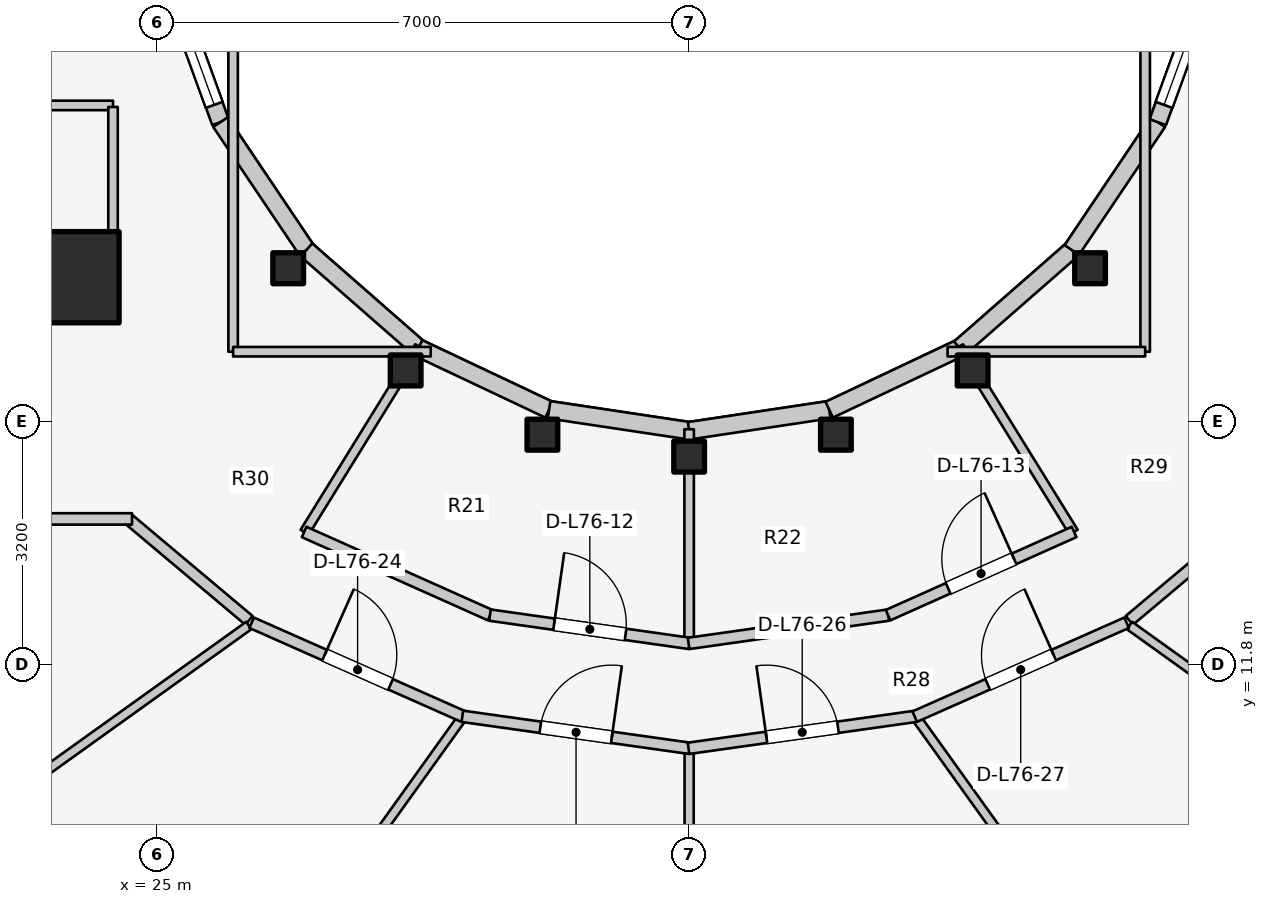
"""IFC4 building model, lengths in metres.
Left out: names, types, materials, properties, quantities, classifications, styles, units other than length and angle.
Written with IfcOpenShell. Run it as: python <this file> out.ifc"""

import sys

from ifc_helpers import new_model, si_unit, direction, frame, frame_2d, origin, origin_2d, place, context, subcontext, project, spatial, rectangle, i_section, extrude, element, fill, save


model = new_model("IFC4")
c1 = context("Model", 3, precision=1e-05, world=origin(), true_north=direction((0.0, 1.0)))
c2 = subcontext(c1, "Body", "Model", "MODEL_VIEW")
j1 = project(units=[si_unit("LENGTHUNIT", "METRE"), si_unit("PLANEANGLEUNIT", "RADIAN")], contexts=[c1])
p1 = place(None, origin())
s1 = spatial("IfcSite", under=j1, at=p1, CompositionType="ELEMENT")
p2 = place(p1, origin())
s2 = spatial("IfcBuilding", under=s1, at=p2, CompositionType="ELEMENT")
p3 = place(p2, frame((0.0, 0.0, 249.6)))
s3 = spatial("IfcBuildingStorey", under=s2, at=p3, CompositionType="ELEMENT", Elevation=249.6)
p4 = place(p3, frame((19.65, 16.55, 0.0), z_axis=(0.0, 0.0, 1.0), x_axis=(1.0, 0.0, 0.0)))
e1 = element("IfcWall", 1, at=p4, inside=s3, PredefinedType="SHEAR", context=c2, shape_type="SweptSolid", body=[
    extrude(rectangle(XDim=4.5, YDim=0.45, at=frame_2d((2.25, 0.0))), origin(), (0.0, 0.0, 1.0), 3.6),
])
p5 = place(p3, frame((23.9, 16.9, 0.0), z_axis=(0.0, 0.0, 1.0), x_axis=(1.0, 0.0, 0.0)))
e2 = element("IfcColumn", 2, at=p5, inside=s3, PredefinedType="COLUMN", context=c2, shape_type="SweptSolid", body=[
    extrude(rectangle(XDim=1.2, YDim=1.2, at=origin_2d()), origin(), (0.0, 0.0, 1.0), 3.6),
])
for number, where, z_axis, x_axis in (
    (3, (26.725, 17.018, 0.0), (0.0, 0.0, 1.0), (1.0, 0.0, 0.0)),
    (4, (28.27, 15.673, 0.0), (0.0, 0.0, 1.0), (1.0, 0.0, 0.0)),
    (5, (30.069, 14.828, 0.0), (0.0, 0.0, 1.0), (1.0, 0.0, 0.0)),
    (6, (32.0, 14.54, 0.0), (0.0, 0.0, 1.0), (1.0, 0.0, 0.0)),
    (7, (33.931, 14.828, 0.0), (0.0, 0.0, 1.0), (1.0, 0.0, 0.0)),
    (8, (35.73, 15.673, 0.0), (0.0, 0.0, 1.0), (1.0, 0.0, 0.0)),
    (9, (37.275, 17.018, 0.0), (0.0, 0.0, 1.0), (1.0, 0.0, 0.0)),
):
    element("IfcColumn", number, at=place(p3, frame(where, z_axis=z_axis, x_axis=x_axis)), inside=s3, PredefinedType="COLUMN", context=c2, shape_type="SweptSolid", body=[
        extrude(i_section(OverallWidth=0.404, OverallDepth=0.407, WebThickness=0.027, FlangeThickness=0.044, FilletRadius=0.025, at=origin_2d()), origin(), (0.0, 0.0, 1.0), 3.6),
    ])
p6 = place(p3, frame((25.123, 20.898, 0.0), z_axis=(0.0, 0.0, 1.0), x_axis=(0.341423187295, -0.93990968033, 0.0)))
e10 = element("IfcWall", 10, at=p6, inside=s3, PredefinedType="STANDARD", context=c2, shape_type="SweptSolid", body=[
    extrude(rectangle(XDim=2.084, YDim=0.23, at=frame_2d((1.042, 0.0))), origin(), (0.0, 0.0, 1.0), 3.28),
])
p7 = place(p6, frame((0.242, 0.0, 0.85)))
e11 = element("IfcOpeningElement", 11, at=p7, cuts=e10, PredefinedType="OPENING", context=c2, shape_type="SweptSolid", body=[
    extrude(rectangle(XDim=1.6, YDim=1.65, at=frame_2d((0.8, 0.825))), frame((0.0, 0.125, 0.0), z_axis=(0.0, -1.0, 0.0), x_axis=(1.0, 0.0, 0.0)), (0.0, 0.0, 1.0), 0.25),
])
p8 = place(p3, frame((25.834, 18.94, 0.0), z_axis=(0.0, 0.0, 1.0), x_axis=(0.558197800898, -0.829707909492, 0.0)))
e12 = element("IfcWall", 12, at=p8, inside=s3, PredefinedType="STANDARD", context=c2, shape_type="SweptSolid", body=[
    extrude(rectangle(XDim=2.027, YDim=0.23, at=frame_2d((1.013, 0.0))), origin(), (0.0, 0.0, 1.0), 2.6),
])
p9 = place(p3, frame((26.965, 17.258, 0.0), z_axis=(0.0, 0.0, 1.0), x_axis=(0.752576694707, -0.658504607869, 0.0)))
e13 = element("IfcWall", 13, at=p9, inside=s3, PredefinedType="STANDARD", context=c2, shape_type="SweptSolid", body=[
    extrude(rectangle(XDim=1.959, YDim=0.23, at=frame_2d((0.98, 0.0))), origin(), (0.0, 0.0, 1.0), 2.6),
])
p10 = place(p3, frame((28.44, 15.968, 0.0), z_axis=(0.0, 0.0, 1.0), x_axis=(0.904179699603, -0.427152280606, 0.0)))
e14 = element("IfcWall", 14, at=p10, inside=s3, PredefinedType="STANDARD", context=c2, shape_type="SweptSolid", body=[
    extrude(rectangle(XDim=1.899, YDim=0.23, at=frame_2d((0.95, 0.0))), origin(), (0.0, 0.0, 1.0), 2.6),
])
for number, where, z_axis, x_axis in (
    (15, (30.157, 15.157, 0.0), (0.0, 0.0, 1.0), (0.989, -0.149, 0.0)),
    (16, (32.0, 14.88, 0.0), (0.0, 0.0, 1.0), (0.989, 0.149, 0.0)),
):
    element("IfcWall", number, at=place(p3, frame(where, z_axis=z_axis, x_axis=x_axis)), inside=s3, PredefinedType="STANDARD", context=c2, shape_type="SweptSolid", body=[
        extrude(rectangle(XDim=1.864, YDim=0.23, at=frame_2d((0.932, 0.0))), origin(), (0.0, 0.0, 1.0), 2.6),
    ])
p11 = place(p3, frame((33.843, 15.157, 0.0), z_axis=(0.0, 0.0, 1.0), x_axis=(0.904179699603, 0.427152280606, 0.0)))
e17 = element("IfcWall", 17, at=p11, inside=s3, PredefinedType="STANDARD", context=c2, shape_type="SweptSolid", body=[
    extrude(rectangle(XDim=1.899, YDim=0.23, at=frame_2d((0.95, 0.0))), origin(), (0.0, 0.0, 1.0), 2.6),
])
p12 = place(p3, frame((35.56, 15.968, 0.0), z_axis=(0.0, 0.0, 1.0), x_axis=(0.752576694707, 0.658504607869, 0.0)))
e18 = element("IfcWall", 18, at=p12, inside=s3, PredefinedType="STANDARD", context=c2, shape_type="SweptSolid", body=[
    extrude(rectangle(XDim=1.959, YDim=0.23, at=frame_2d((0.98, 0.0))), origin(), (0.0, 0.0, 1.0), 2.6),
])
p13 = place(p3, frame((37.035, 17.258, 0.0), z_axis=(0.0, 0.0, 1.0), x_axis=(0.558197800898, 0.829707909492, 0.0)))
e19 = element("IfcWall", 19, at=p13, inside=s3, PredefinedType="STANDARD", context=c2, shape_type="SweptSolid", body=[
    extrude(rectangle(XDim=2.027, YDim=0.23, at=frame_2d((1.013, 0.0))), origin(), (0.0, 0.0, 1.0), 2.6),
])
p14 = place(p3, frame((38.166, 18.94, 0.0), z_axis=(0.0, 0.0, 1.0), x_axis=(0.341423187295, 0.93990968033, 0.0)))
e20 = element("IfcWall", 20, at=p14, inside=s3, PredefinedType="STANDARD", context=c2, shape_type="SweptSolid", body=[
    extrude(rectangle(XDim=2.084, YDim=0.23, at=frame_2d((1.042, 0.0))), origin(), (0.0, 0.0, 1.0), 3.28),
])
p15 = place(p14, frame((0.242, 0.0, 0.85)))
e21 = element("IfcOpeningElement", 21, at=p15, cuts=e20, PredefinedType="OPENING", context=c2, shape_type="SweptSolid", body=[
    extrude(rectangle(XDim=1.6, YDim=1.65, at=frame_2d((0.8, 0.825))), frame((0.0, 0.125, 0.0), z_axis=(0.0, -1.0, 0.0), x_axis=(1.0, 0.0, 0.0)), (0.0, 0.0, 1.0), 0.25),
])
p16 = place(p3, frame((19.55, 19.16, 0.0), z_axis=(0.0, 0.0, 1.0), x_axis=(1.0, 0.0, 0.0)))
e22 = element("IfcWall", 22, at=p16, inside=s3, PredefinedType="PARTITIONING", context=c2, shape_type="SweptSolid", body=[
    extrude(rectangle(XDim=4.87, YDim=0.125, at=frame_2d((2.435, 0.0))), origin(), (0.0, 0.0, 1.0), 2.62),
])
p17 = place(p16, frame((2.272, 0.0, 0.0)))
e23 = element("IfcOpeningElement", 23, at=p17, cuts=e22, PredefinedType="OPENING", context=c2, shape_type="SweptSolid", body=[
    extrude(rectangle(XDim=0.85, YDim=2.05, at=frame_2d((0.425, 1.025))), frame((0.0, 0.073, 0.0), z_axis=(0.0, -1.0, 0.0), x_axis=(1.0, 0.0, 0.0)), (0.0, 0.0, 1.0), 0.145),
])
p18 = place(p3, frame((24.42, 17.1, 0.0), z_axis=(0.0, 0.0, 1.0), x_axis=(0.0, 1.0, 0.0)))
e24 = element("IfcWall", 24, at=p18, inside=s3, PredefinedType="PARTITIONING", context=c2, shape_type="SweptSolid", body=[
    extrude(rectangle(XDim=2.04, YDim=0.125, at=frame_2d((1.02, 0.0))), origin(), (0.0, 0.0, 1.0), 2.672),
])
p19 = place(p3, frame((28.45, 15.985, 0.0), z_axis=(0.0, 0.0, 1.0), x_axis=(-0.52592395012, -0.850531597702, 0.0)))
e25 = element("IfcWall", 25, at=p19, inside=s3, PredefinedType="PARTITIONING", context=c2, shape_type="SweptSolid", body=[
    extrude(rectangle(XDim=2.869, YDim=0.125, at=frame_2d((1.435, 0.0))), origin(), (0.0, 0.0, 1.0), 2.672),
])
p20 = place(p3, frame((32.0, 14.9, 0.0), z_axis=(0.0, 0.0, 1.0), x_axis=(0.0, -1.0, 0.0)))
e26 = element("IfcWall", 26, at=p20, inside=s3, PredefinedType="PARTITIONING", context=c2, shape_type="SweptSolid", body=[
    extrude(rectangle(XDim=2.818, YDim=0.125, at=frame_2d((1.409, 0.0))), origin(), (0.0, 0.0, 1.0), 2.672),
])
p21 = place(p3, frame((35.55, 15.985, 0.0), z_axis=(0.0, 0.0, 1.0), x_axis=(0.52592395012, -0.850531597702, 0.0)))
e27 = element("IfcWall", 27, at=p21, inside=s3, PredefinedType="PARTITIONING", context=c2, shape_type="SweptSolid", body=[
    extrude(rectangle(XDim=2.869, YDim=0.125, at=frame_2d((1.435, 0.0))), origin(), (0.0, 0.0, 1.0), 2.672),
])
p22 = place(p3, frame((26.935, 13.549, 0.0), z_axis=(0.0, 0.0, 1.0), x_axis=(0.912859324183, -0.408274239027, 0.0)))
e28 = element("IfcWall", 28, at=p22, inside=s3, PredefinedType="PARTITIONING", context=c2, shape_type="SweptSolid", body=[
    extrude(rectangle(XDim=2.682, YDim=0.15, at=frame_2d((1.341, 0.0))), origin(), (0.0, 0.0, 1.0), 2.816),
])
p23 = place(p3, frame((29.38, 12.455, 0.0), z_axis=(0.0, 0.0, 1.0), x_axis=(0.990096156252, -0.140390887794, 0.0)))
e29 = element("IfcWall", 29, at=p23, inside=s3, PredefinedType="PARTITIONING", context=c2, shape_type="SweptSolid", body=[
    extrude(rectangle(XDim=2.654, YDim=0.15, at=frame_2d((1.327, 0.0))), origin(), (0.0, 0.0, 1.0), 2.816),
])
p24 = place(p23, frame((0.852, 0.0, 0.0)))
e30 = element("IfcOpeningElement", 30, at=p24, cuts=e29, PredefinedType="OPENING", context=c2, shape_type="SweptSolid", body=[
    extrude(rectangle(XDim=0.95, YDim=2.1, at=frame_2d((0.475, 1.05))), frame((0.0, 0.085, 0.0), z_axis=(0.0, -1.0, 0.0), x_axis=(1.0, 0.0, 0.0)), (0.0, 0.0, 1.0), 0.17),
])
p25 = place(p3, frame((31.993, 12.082, 0.0), z_axis=(0.0, 0.0, 1.0), x_axis=(0.990096156252, 0.140390887794, 0.0)))
e31 = element("IfcWall", 31, at=p25, inside=s3, PredefinedType="PARTITIONING", context=c2, shape_type="SweptSolid", body=[
    extrude(rectangle(XDim=2.654, YDim=0.15, at=frame_2d((1.327, 0.0))), origin(), (0.0, 0.0, 1.0), 2.816),
])
p26 = place(p3, frame((34.617, 12.454, 0.0), z_axis=(0.0, 0.0, 1.0), x_axis=(0.912859324183, 0.408274239027, 0.0)))
e32 = element("IfcWall", 32, at=p26, inside=s3, PredefinedType="PARTITIONING", context=c2, shape_type="SweptSolid", body=[
    extrude(rectangle(XDim=2.682, YDim=0.15, at=frame_2d((1.341, 0.0))), origin(), (0.0, 0.0, 1.0), 2.816),
])
p27 = place(p26, frame((0.866, 0.0, 0.0)))
e33 = element("IfcOpeningElement", 33, at=p27, cuts=e32, PredefinedType="OPENING", context=c2, shape_type="SweptSolid", body=[
    extrude(rectangle(XDim=0.95, YDim=2.1, at=frame_2d((0.475, 1.05))), frame((0.0, 0.085, 0.0), z_axis=(0.0, -1.0, 0.0), x_axis=(1.0, 0.0, 0.0)), (0.0, 0.0, 1.0), 0.17),
])
p28 = place(p3, frame((26.0, 15.92, 0.0), z_axis=(0.0, 0.0, 1.0), x_axis=(0.0, 1.0, 0.0)))
e34 = element("IfcWall", 34, at=p28, inside=s3, PredefinedType="PARTITIONING", context=c2, shape_type="SweptSolid", body=[
    extrude(rectangle(XDim=4.28, YDim=0.125, at=frame_2d((2.14, 0.0))), origin(), (0.0, 0.0, 1.0), 2.672),
])
p29 = place(p3, frame((26.0, 15.92, 0.0), z_axis=(0.0, 0.0, 1.0), x_axis=(1.0, 0.0, 0.0)))
e35 = element("IfcWall", 35, at=p29, inside=s3, PredefinedType="PARTITIONING", context=c2, shape_type="SweptSolid", body=[
    extrude(rectangle(XDim=2.6, YDim=0.125, at=frame_2d((1.3, 0.0))), origin(), (0.0, 0.0, 1.0), 2.672),
])
p30 = place(p3, frame((38.0, 15.92, 0.0), z_axis=(0.0, 0.0, 1.0), x_axis=(0.0, 1.0, 0.0)))
e36 = element("IfcWall", 36, at=p30, inside=s3, PredefinedType="PARTITIONING", context=c2, shape_type="SweptSolid", body=[
    extrude(rectangle(XDim=4.28, YDim=0.125, at=frame_2d((2.14, 0.0))), origin(), (0.0, 0.0, 1.0), 2.672),
])
p31 = place(p3, frame((35.4, 15.92, 0.0), z_axis=(0.0, 0.0, 1.0), x_axis=(1.0, 0.0, 0.0)))
e37 = element("IfcWall", 37, at=p31, inside=s3, PredefinedType="PARTITIONING", context=c2, shape_type="SweptSolid", body=[
    extrude(rectangle(XDim=2.6, YDim=0.125, at=frame_2d((1.3, 0.0))), origin(), (0.0, 0.0, 1.0), 2.672),
])
p32 = place(p3, frame((26.209, 12.385, 0.0), z_axis=(0.0, 0.0, 1.0), x_axis=(-0.765677451641, 0.643224719711, 0.0)))
e38 = element("IfcWall", 38, at=p32, inside=s3, PredefinedType="PARTITIONING", context=c2, shape_type="SweptSolid", body=[
    extrude(rectangle(XDim=2.105, YDim=0.15, at=frame_2d((1.053, 0.0))), origin(), (0.0, 0.0, 1.0), 2.816),
])
p33 = place(p3, frame((17.15, 13.72, 0.0), z_axis=(0.0, 0.0, 1.0), x_axis=(1.0, 0.0, 0.0)))
e39 = element("IfcWall", 39, at=p33, inside=s3, PredefinedType="PARTITIONING", context=c2, shape_type="SweptSolid", body=[
    extrude(rectangle(XDim=7.52, YDim=0.15, at=frame_2d((3.76, 0.0))), origin(), (0.0, 0.0, 1.0), 2.816),
])
p34 = place(p33, frame((1.3, 0.0, 0.0)))
e40 = element("IfcOpeningElement", 40, at=p34, cuts=e39, PredefinedType="OPENING", context=c2, shape_type="SweptSolid", body=[
    extrude(rectangle(XDim=0.9, YDim=2.1, at=frame_2d((0.45, 1.05))), frame((0.0, 0.085, 0.0), z_axis=(0.0, -1.0, 0.0), x_axis=(1.0, 0.0, 0.0)), (0.0, 0.0, 1.0), 0.17),
])
p35 = place(p3, frame((37.791, 12.385, 0.0), z_axis=(0.0, 0.0, 1.0), x_axis=(0.765677451641, 0.643224719711, 0.0)))
e41 = element("IfcWall", 41, at=p35, inside=s3, PredefinedType="PARTITIONING", context=c2, shape_type="SweptSolid", body=[
    extrude(rectangle(XDim=2.105, YDim=0.15, at=frame_2d((1.053, 0.0))), origin(), (0.0, 0.0, 1.0), 2.816),
])
p36 = place(p3, frame((26.206, 12.318, 0.0), z_axis=(0.0, 0.0, 1.0), x_axis=(-0.812763742602, -0.582593424879, 0.0)))
e42 = element("IfcWall", 42, at=p36, inside=s3, PredefinedType="MOVABLE", context=c2, shape_type="SweptSolid", body=[
    extrude(rectangle(XDim=6.966, YDim=0.12, at=frame_2d((3.483, 0.0))), origin(), (0.0, 0.0, 1.0), 2.66),
])
p37 = place(p3, frame((28.992, 11.076, 0.0), z_axis=(0.0, 0.0, 1.0), x_axis=(-0.582726066442, -0.812668648029, 0.0)))
e43 = element("IfcWall", 43, at=p37, inside=s3, PredefinedType="MOVABLE", context=c2, shape_type="SweptSolid", body=[
    extrude(rectangle(XDim=6.515, YDim=0.12, at=frame_2d((3.257, 0.0))), origin(), (0.0, 0.0, 1.0), 2.66),
])
p38 = place(p3, frame((32.0, 10.647, 0.0), z_axis=(0.0, 0.0, 1.0), x_axis=(0.0, -1.0, 0.0)))
e44 = element("IfcWall", 44, at=p38, inside=s3, PredefinedType="MOVABLE", context=c2, shape_type="SweptSolid", body=[
    extrude(rectangle(XDim=5.727, YDim=0.12, at=frame_2d((2.864, 0.0))), origin(), (0.0, 0.0, 1.0), 2.66),
])
p39 = place(p3, frame((35.008, 11.076, 0.0), z_axis=(0.0, 0.0, 1.0), x_axis=(0.582726066442, -0.812668648029, 0.0)))
e45 = element("IfcWall", 45, at=p39, inside=s3, PredefinedType="MOVABLE", context=c2, shape_type="SweptSolid", body=[
    extrude(rectangle(XDim=6.515, YDim=0.12, at=frame_2d((3.257, 0.0))), origin(), (0.0, 0.0, 1.0), 2.66),
])
p40 = place(p3, frame((37.794, 12.318, 0.0), z_axis=(0.0, 0.0, 1.0), x_axis=(0.812763742602, -0.582593424879, 0.0)))
e46 = element("IfcWall", 46, at=p40, inside=s3, PredefinedType="MOVABLE", context=c2, shape_type="SweptSolid", body=[
    extrude(rectangle(XDim=6.966, YDim=0.12, at=frame_2d((3.483, 0.0))), origin(), (0.0, 0.0, 1.0), 2.66),
])
p41 = place(p3, frame((26.244, 12.354, 0.0), z_axis=(0.0, 0.0, 1.0), x_axis=(0.914302802833, -0.405031337963, 0.0)))
e47 = element("IfcWall", 47, at=p41, inside=s3, PredefinedType="PARTITIONING", context=c2, shape_type="SweptSolid", body=[
    extrude(rectangle(XDim=3.049, YDim=0.15, at=frame_2d((1.525, 0.0))), origin(), (0.0, 0.0, 1.0), 2.816),
])
p42 = place(p41, frame((1.05, 0.0, 0.0)))
e48 = element("IfcOpeningElement", 48, at=p42, cuts=e47, PredefinedType="OPENING", context=c2, shape_type="SweptSolid", body=[
    extrude(rectangle(XDim=0.95, YDim=2.1, at=frame_2d((0.475, 1.05))), frame((0.0, 0.085, 0.0), z_axis=(0.0, -1.0, 0.0), x_axis=(1.0, 0.0, 0.0)), (0.0, 0.0, 1.0), 0.17),
])
p43 = place(p3, frame((29.016, 11.123, 0.0), z_axis=(0.0, 0.0, 1.0), x_axis=(0.990225561979, -0.139475217886, 0.0)))
e49 = element("IfcWall", 49, at=p43, inside=s3, PredefinedType="PARTITIONING", context=c2, shape_type="SweptSolid", body=[
    extrude(rectangle(XDim=3.021, YDim=0.15, at=frame_2d((1.511, 0.0))), origin(), (0.0, 0.0, 1.0), 2.816),
])
p44 = place(p43, frame((1.036, 0.0, 0.0)))
e50 = element("IfcOpeningElement", 50, at=p44, cuts=e49, PredefinedType="OPENING", context=c2, shape_type="SweptSolid", body=[
    extrude(rectangle(XDim=0.95, YDim=2.1, at=frame_2d((0.475, 1.05))), frame((0.0, 0.085, 0.0), z_axis=(0.0, -1.0, 0.0), x_axis=(1.0, 0.0, 0.0)), (0.0, 0.0, 1.0), 0.17),
])
p45 = place(p3, frame((31.992, 10.702, 0.0), z_axis=(0.0, 0.0, 1.0), x_axis=(0.990225561979, 0.139475217886, 0.0)))
e51 = element("IfcWall", 51, at=p45, inside=s3, PredefinedType="PARTITIONING", context=c2, shape_type="SweptSolid", body=[
    extrude(rectangle(XDim=3.021, YDim=0.15, at=frame_2d((1.511, 0.0))), origin(), (0.0, 0.0, 1.0), 2.816),
])
p46 = place(p45, frame((1.036, 0.0, 0.0)))
e52 = element("IfcOpeningElement", 52, at=p46, cuts=e51, PredefinedType="OPENING", context=c2, shape_type="SweptSolid", body=[
    extrude(rectangle(XDim=0.95, YDim=2.1, at=frame_2d((0.475, 1.05))), frame((0.0, 0.085, 0.0), z_axis=(0.0, -1.0, 0.0), x_axis=(1.0, 0.0, 0.0)), (0.0, 0.0, 1.0), 0.17),
])
p47 = place(p3, frame((34.968, 11.119, 0.0), z_axis=(0.0, 0.0, 1.0), x_axis=(0.914302802833, 0.405031337963, 0.0)))
e53 = element("IfcWall", 53, at=p47, inside=s3, PredefinedType="PARTITIONING", context=c2, shape_type="SweptSolid", body=[
    extrude(rectangle(XDim=3.049, YDim=0.15, at=frame_2d((1.525, 0.0))), origin(), (0.0, 0.0, 1.0), 2.816),
])
p48 = place(p47, frame((1.05, 0.0, 0.0)))
e54 = element("IfcOpeningElement", 54, at=p48, cuts=e53, PredefinedType="OPENING", context=c2, shape_type="SweptSolid", body=[
    extrude(rectangle(XDim=0.95, YDim=2.1, at=frame_2d((0.475, 1.05))), frame((0.0, 0.085, 0.0), z_axis=(0.0, -1.0, 0.0), x_axis=(1.0, 0.0, 0.0)), (0.0, 0.0, 1.0), 0.17),
])
p49 = place(p7, origin())
e55 = element("IfcWindow", 55, at=p49, inside=s3, PartitioningType="SINGLE_PANEL", PredefinedType="WINDOW", context=c2, shape_type="SweptSolid", body=[
    extrude(rectangle(XDim=1.6, YDim=1.65, at=frame_2d((0.8, 0.825))), frame((0.0, 0.03, 0.0), z_axis=(0.0, -1.0, 0.0), x_axis=(1.0, 0.0, 0.0)), (0.0, 0.0, 1.0), 0.06),
])
fill(e11, e55)
p50 = place(p15, origin())
e56 = element("IfcWindow", 56, at=p50, inside=s3, PartitioningType="SINGLE_PANEL", PredefinedType="WINDOW", context=c2, shape_type="SweptSolid", body=[
    extrude(rectangle(XDim=1.6, YDim=1.65, at=frame_2d((0.8, 0.825))), frame((0.0, 0.03, 0.0), z_axis=(0.0, -1.0, 0.0), x_axis=(1.0, 0.0, 0.0)), (0.0, 0.0, 1.0), 0.06),
])
fill(e21, e56)
p51 = place(p24, origin())
e57 = element("IfcDoor", 57, at=p51, inside=s3, OperationType="SINGLE_SWING_LEFT", PredefinedType="DOOR", context=c2, shape_type="SweptSolid", body=[
    extrude(rectangle(XDim=0.95, YDim=2.1, at=frame_2d((0.475, 1.05))), frame((0.0, 0.025, 0.0), z_axis=(0.0, -1.0, 0.0), x_axis=(1.0, 0.0, 0.0)), (0.0, 0.0, 1.0), 0.05),
])
fill(e30, e57)
p52 = place(p27, origin())
e58 = element("IfcDoor", 58, at=p52, inside=s3, OperationType="SINGLE_SWING_RIGHT", PredefinedType="DOOR", context=c2, shape_type="SweptSolid", body=[
    extrude(rectangle(XDim=0.95, YDim=2.1, at=frame_2d((0.475, 1.05))), frame((0.0, 0.025, 0.0), z_axis=(0.0, -1.0, 0.0), x_axis=(1.0, 0.0, 0.0)), (0.0, 0.0, 1.0), 0.05),
])
fill(e33, e58)
p53 = place(p42, origin())
e59 = element("IfcDoor", 59, at=p53, inside=s3, OperationType="SINGLE_SWING_LEFT", PredefinedType="DOOR", context=c2, shape_type="SweptSolid", body=[
    extrude(rectangle(XDim=0.95, YDim=2.1, at=frame_2d((0.475, 1.05))), frame((0.0, 0.025, 0.0), z_axis=(0.0, -1.0, 0.0), x_axis=(1.0, 0.0, 0.0)), (0.0, 0.0, 1.0), 0.05),
])
fill(e48, e59)
p54 = place(p44, origin())
e60 = element("IfcDoor", 60, at=p54, inside=s3, OperationType="SINGLE_SWING_RIGHT", PredefinedType="DOOR", context=c2, shape_type="SweptSolid", body=[
    extrude(rectangle(XDim=0.95, YDim=2.1, at=frame_2d((0.475, 1.05))), frame((0.0, 0.025, 0.0), z_axis=(0.0, -1.0, 0.0), x_axis=(1.0, 0.0, 0.0)), (0.0, 0.0, 1.0), 0.05),
])
fill(e50, e60)
p55 = place(p46, origin())
e61 = element("IfcDoor", 61, at=p55, inside=s3, OperationType="SINGLE_SWING_LEFT", PredefinedType="DOOR", context=c2, shape_type="SweptSolid", body=[
    extrude(rectangle(XDim=0.95, YDim=2.1, at=frame_2d((0.475, 1.05))), frame((0.0, 0.025, 0.0), z_axis=(0.0, -1.0, 0.0), x_axis=(1.0, 0.0, 0.0)), (0.0, 0.0, 1.0), 0.05),
])
fill(e52, e61)
p56 = place(p48, origin())
e62 = element("IfcDoor", 62, at=p56, inside=s3, OperationType="SINGLE_SWING_RIGHT", PredefinedType="DOOR", context=c2, shape_type="SweptSolid", body=[
    extrude(rectangle(XDim=0.95, YDim=2.1, at=frame_2d((0.475, 1.05))), frame((0.0, 0.025, 0.0), z_axis=(0.0, -1.0, 0.0), x_axis=(1.0, 0.0, 0.0)), (0.0, 0.0, 1.0), 0.05),
])
fill(e54, e62)
save(model, sys.argv[1])
